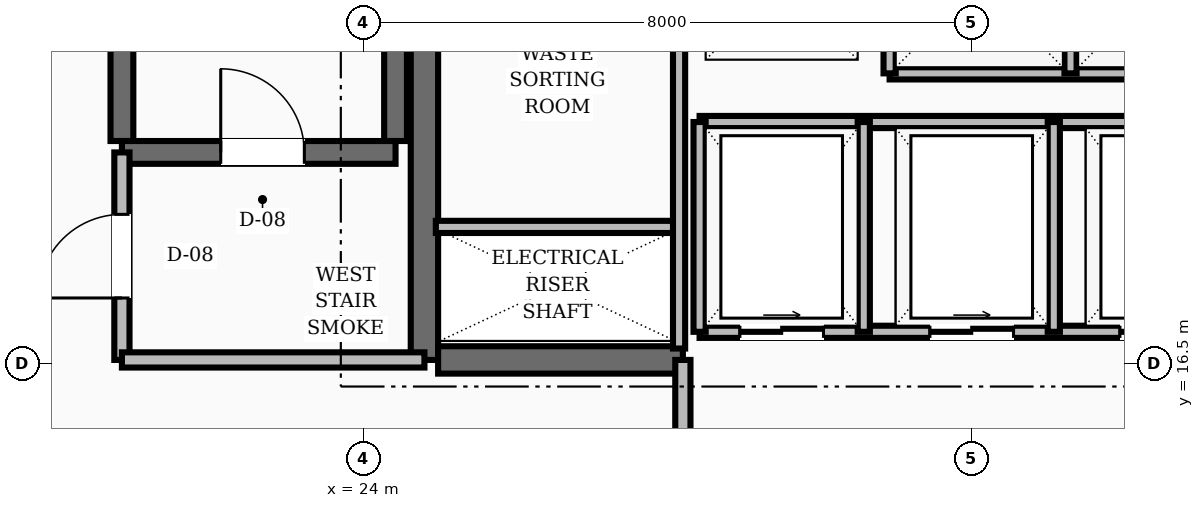
"""IFC4 building model, lengths in metres.
Left out: names, types, materials, properties, quantities, classifications, styles, units other than length and angle.
Written with IfcOpenShell. Run it as: python <this file> out.ifc"""

import sys

from ifc_helpers import new_model, si_unit, direction, frame, frame_2d, origin, place, context, subcontext, project, spatial, rectangle, extrude, element, fill, save


model = new_model("IFC4")
c1 = context("Model", 3, precision=1e-05, world=origin(), true_north=direction((0.0, 1.0)))
c2 = subcontext(c1, "Body", "Model", "MODEL_VIEW")
j1 = project(units=[si_unit("LENGTHUNIT", "METRE"), si_unit("PLANEANGLEUNIT", "RADIAN")], contexts=[c1])
p1 = place(None, origin())
s1 = spatial("IfcSite", under=j1, at=p1, CompositionType="ELEMENT")
p2 = place(p1, origin())
s2 = spatial("IfcBuilding", under=s1, at=p2, CompositionType="ELEMENT")
p3 = place(p2, frame((0.0, 0.0, 124.4)))
s3 = spatial("IfcBuildingStorey", under=s2, at=p3, CompositionType="ELEMENT", Elevation=124.4)
p4 = place(p3, frame((24.8, 16.55, 0.0), z_axis=(0.0, 0.0, 1.0), x_axis=(0.0, 1.0, 0.0)))
e1 = element("IfcWall", 1, at=p4, inside=s3, PredefinedType="SHEAR", context=c2, shape_type="SweptSolid", body=[
    extrude(rectangle(XDim=6.3, YDim=0.36, at=frame_2d((3.15, 0.0))), origin(), (0.0, 0.0, 1.0), 3.6),
])
p5 = place(p3, frame((24.98, 16.55, 0.0), z_axis=(0.0, 0.0, 1.0), x_axis=(1.0, 0.0, 0.0)))
e2 = element("IfcWall", 2, at=p5, inside=s3, PredefinedType="SHEAR", context=c2, shape_type="SweptSolid", body=[
    extrude(rectangle(XDim=3.22, YDim=0.36, at=frame_2d((1.61, 0.0))), origin(), (0.0, 0.0, 1.0), 3.6),
])
for number, where, z_axis, x_axis in (
    (3, (20.82, 19.43, 0.0), (0.0, 0.0, 1.0), (0.0, 1.0, 0.0)),
    (4, (24.42, 19.43, 0.0), (0.0, 0.0, 1.0), (0.0, 1.0, 0.0)),
):
    element("IfcWall", number, at=place(p3, frame(where, z_axis=z_axis, x_axis=x_axis)), inside=s3, PredefinedType="SHEAR", context=c2, shape_type="SweptSolid", body=[
        extrude(rectangle(XDim=8.74, YDim=0.3, at=frame_2d((4.37, 0.0))), origin(), (0.0, 0.0, 1.0), 3.6),
    ])
p6 = place(p3, frame((20.82, 19.28, 0.0), z_axis=(0.0, 0.0, 1.0), x_axis=(1.0, 0.0, 0.0)))
e5 = element("IfcWall", 5, at=p6, inside=s3, PredefinedType="SHEAR", context=c2, shape_type="SweptSolid", body=[
    extrude(rectangle(XDim=3.6, YDim=0.3, at=frame_2d((1.8, 0.0))), origin(), (0.0, 0.0, 1.0), 3.6),
])
p7 = place(p6, frame((1.3, 0.0, 0.0)))
e6 = element("IfcOpeningElement", 6, at=p7, cuts=e5, PredefinedType="OPENING", context=c2, shape_type="SweptSolid", body=[
    extrude(rectangle(XDim=1.1, YDim=2.1, at=frame_2d((0.55, 1.05))), frame((0.0, 0.16, 0.0), z_axis=(0.0, -1.0, 0.0), x_axis=(1.0, 0.0, 0.0)), (0.0, 0.0, 1.0), 0.32),
])
p8 = place(p3, frame((20.82, 16.55, 0.0), z_axis=(0.0, 0.0, 1.0), x_axis=(0.0, 1.0, 0.0)))
e7 = element("IfcWall", 7, at=p8, inside=s3, PredefinedType="SOLIDWALL", context=c2, shape_type="SweptSolid", body=[
    extrude(rectangle(XDim=2.73, YDim=0.2, at=frame_2d((1.365, 0.0))), origin(), (0.0, 0.0, 1.0), 2.8),
])
p9 = place(p8, frame((0.815, 0.0, 0.0)))
e8 = element("IfcOpeningElement", 8, at=p9, cuts=e7, PredefinedType="OPENING", context=c2, shape_type="SweptSolid", body=[
    extrude(rectangle(XDim=1.1, YDim=2.1, at=frame_2d((0.55, 1.05))), frame((0.0, 0.11, 0.0), z_axis=(0.0, -1.0, 0.0), x_axis=(1.0, 0.0, 0.0)), (0.0, 0.0, 1.0), 0.22),
])
p10 = place(p3, frame((20.82, 16.55, 0.0), z_axis=(0.0, 0.0, 1.0), x_axis=(1.0, 0.0, 0.0)))
e9 = element("IfcWall", 9, at=p10, inside=s3, PredefinedType="SOLIDWALL", context=c2, shape_type="SweptSolid", body=[
    extrude(rectangle(XDim=3.98, YDim=0.2, at=frame_2d((1.99, 0.0))), origin(), (0.0, 0.0, 1.0), 2.8),
])
p11 = place(p3, frame((28.2, 14.35, 0.0), z_axis=(0.0, 0.0, 1.0), x_axis=(0.0, 1.0, 0.0)))
e10 = element("IfcWall", 10, at=p11, inside=s3, PredefinedType="SOLIDWALL", context=c2, shape_type="SweptSolid", body=[
    extrude(rectangle(XDim=2.2, YDim=0.2, at=frame_2d((1.1, 0.0))), origin(), (0.0, 0.0, 1.0), 2.8),
])
p12 = place(p3, frame((30.92, 20.32, 0.0), z_axis=(0.0, 0.0, 1.0), x_axis=(1.0, 0.0, 0.0)))
e11 = element("IfcWall", 11, at=p12, inside=s3, PredefinedType="SOLIDWALL", context=c2, shape_type="SweptSolid", body=[
    extrude(rectangle(XDim=4.76, YDim=0.16, at=frame_2d((2.38, 0.0))), origin(), (0.0, 0.0, 1.0), 2.8),
])
for number, where, z_axis, x_axis in (
    (12, (30.92, 20.32, 0.0), (0.0, 0.0, 1.0), (0.0, 1.0, 0.0)),
    (13, (33.3, 20.32, 0.0), (0.0, 0.0, 1.0), (0.0, 1.0, 0.0)),
):
    element("IfcWall", number, at=place(p3, frame(where, z_axis=z_axis, x_axis=x_axis)), inside=s3, PredefinedType="SOLIDWALL", context=c2, shape_type="SweptSolid", body=[
        extrude(rectangle(XDim=2.36, YDim=0.16, at=frame_2d((1.18, 0.0))), origin(), (0.0, 0.0, 1.0), 2.8),
    ])
p13 = place(p3, frame((28.42, 16.92, 0.0), z_axis=(0.0, 0.0, 1.0), x_axis=(1.0, 0.0, 0.0)))
e14 = element("IfcWall", 14, at=p13, inside=s3, PredefinedType="SOLIDWALL", context=c2, shape_type="SweptSolid", body=[
    extrude(rectangle(XDim=7.16, YDim=0.16, at=frame_2d((3.58, 0.0))), origin(), (0.0, 0.0, 1.0), 2.8),
])
p14 = place(p13, frame((0.53, 0.0, 0.0)))
e15 = element("IfcOpeningElement", 15, at=p14, cuts=e14, PredefinedType="OPENING", context=c2, shape_type="SweptSolid", body=[
    extrude(rectangle(XDim=1.1, YDim=2.15, at=frame_2d((0.55, 1.075))), frame((0.0, 0.09, 0.0), z_axis=(0.0, -1.0, 0.0), x_axis=(1.0, 0.0, 0.0)), (0.0, 0.0, 1.0), 0.18),
])
p15 = place(p13, frame((3.03, 0.0, 0.0)))
e16 = element("IfcOpeningElement", 16, at=p15, cuts=e14, PredefinedType="OPENING", context=c2, shape_type="SweptSolid", body=[
    extrude(rectangle(XDim=1.1, YDim=2.15, at=frame_2d((0.55, 1.075))), frame((0.0, 0.09, 0.0), z_axis=(0.0, -1.0, 0.0), x_axis=(1.0, 0.0, 0.0)), (0.0, 0.0, 1.0), 0.18),
])
p16 = place(p13, frame((5.53, 0.0, 0.0)))
e17 = element("IfcOpeningElement", 17, at=p16, cuts=e14, PredefinedType="OPENING", context=c2, shape_type="SweptSolid", body=[
    extrude(rectangle(XDim=1.1, YDim=2.15, at=frame_2d((0.55, 1.075))), frame((0.0, 0.09, 0.0), z_axis=(0.0, -1.0, 0.0), x_axis=(1.0, 0.0, 0.0)), (0.0, 0.0, 1.0), 0.18),
])
p17 = place(p3, frame((28.42, 19.68, 0.0), z_axis=(0.0, 0.0, 1.0), x_axis=(1.0, 0.0, 0.0)))
e18 = element("IfcWall", 18, at=p17, inside=s3, PredefinedType="SOLIDWALL", context=c2, shape_type="SweptSolid", body=[
    extrude(rectangle(XDim=7.16, YDim=0.16, at=frame_2d((3.58, 0.0))), origin(), (0.0, 0.0, 1.0), 2.8),
])
for number, where, z_axis, x_axis in (
    (19, (28.42, 16.92, 0.0), (0.0, 0.0, 1.0), (0.0, 1.0, 0.0)),
    (20, (30.58, 16.92, 0.0), (0.0, 0.0, 1.0), (0.0, 1.0, 0.0)),
    (21, (33.08, 16.92, 0.0), (0.0, 0.0, 1.0), (0.0, 1.0, 0.0)),
):
    element("IfcWall", number, at=place(p3, frame(where, z_axis=z_axis, x_axis=x_axis)), inside=s3, PredefinedType="SOLIDWALL", context=c2, shape_type="SweptSolid", body=[
        extrude(rectangle(XDim=2.76, YDim=0.16, at=frame_2d((1.38, 0.0))), origin(), (0.0, 0.0, 1.0), 2.8),
    ])
p18 = place(p3, frame((24.95, 18.3, 0.0), z_axis=(0.0, 0.0, 1.0), x_axis=(1.0, 0.0, 0.0)))
e22 = element("IfcWall", 22, at=p18, inside=s3, PredefinedType="SOLIDWALL", context=c2, shape_type="SweptSolid", body=[
    extrude(rectangle(XDim=3.2, YDim=0.16, at=frame_2d((1.6, 0.0))), origin(), (0.0, 0.0, 1.0), 2.8),
])
p19 = place(p3, frame((28.15, 16.7, 0.0), z_axis=(0.0, 0.0, 1.0), x_axis=(0.0, 1.0, 0.0)))
e23 = element("IfcWall", 23, at=p19, inside=s3, PredefinedType="SOLIDWALL", context=c2, shape_type="SweptSolid", body=[
    extrude(rectangle(XDim=6.05, YDim=0.16, at=frame_2d((3.025, 0.0))), origin(), (0.0, 0.0, 1.0), 2.8),
])
p20 = place(p7, origin())
e24 = element("IfcDoor", 24, at=p20, inside=s3, OperationType="SINGLE_SWING_LEFT", PredefinedType="DOOR", context=c2, shape_type="SweptSolid", body=[
    extrude(rectangle(XDim=1.1, YDim=2.1, at=frame_2d((0.55, 1.05))), frame((0.0, 0.025, 0.0), z_axis=(0.0, -1.0, 0.0), x_axis=(1.0, 0.0, 0.0)), (0.0, 0.0, 1.0), 0.05),
])
fill(e6, e24)
p21 = place(p9, origin())
e25 = element("IfcDoor", 25, at=p21, inside=s3, OperationType="SINGLE_SWING_LEFT", PredefinedType="DOOR", context=c2, shape_type="SweptSolid", body=[
    extrude(rectangle(XDim=1.1, YDim=2.1, at=frame_2d((0.55, 1.05))), frame((0.0, 0.025, 0.0), z_axis=(0.0, -1.0, 0.0), x_axis=(1.0, 0.0, 0.0)), (0.0, 0.0, 1.0), 0.05),
])
fill(e8, e25)
p22 = place(p14, origin())
e26 = element("IfcDoor", 26, at=p22, inside=s3, OperationType="SLIDING_TO_RIGHT", PredefinedType="DOOR", context=c2, shape_type="SweptSolid", body=[
    extrude(rectangle(XDim=1.1, YDim=2.15, at=frame_2d((0.55, 1.075))), frame((0.0, 0.025, 0.0), z_axis=(0.0, -1.0, 0.0), x_axis=(1.0, 0.0, 0.0)), (0.0, 0.0, 1.0), 0.05),
])
fill(e15, e26)
p23 = place(p15, origin())
e27 = element("IfcDoor", 27, at=p23, inside=s3, OperationType="SLIDING_TO_RIGHT", PredefinedType="DOOR", context=c2, shape_type="SweptSolid", body=[
    extrude(rectangle(XDim=1.1, YDim=2.15, at=frame_2d((0.55, 1.075))), frame((0.0, 0.025, 0.0), z_axis=(0.0, -1.0, 0.0), x_axis=(1.0, 0.0, 0.0)), (0.0, 0.0, 1.0), 0.05),
])
fill(e16, e27)
p24 = place(p16, origin())
e28 = element("IfcDoor", 28, at=p24, inside=s3, OperationType="SLIDING_TO_RIGHT", PredefinedType="DOOR", context=c2, shape_type="SweptSolid", body=[
    extrude(rectangle(XDim=1.1, YDim=2.15, at=frame_2d((0.55, 1.075))), frame((0.0, 0.025, 0.0), z_axis=(0.0, -1.0, 0.0), x_axis=(1.0, 0.0, 0.0)), (0.0, 0.0, 1.0), 0.05),
])
fill(e17, e28)
save(model, sys.argv[1])
